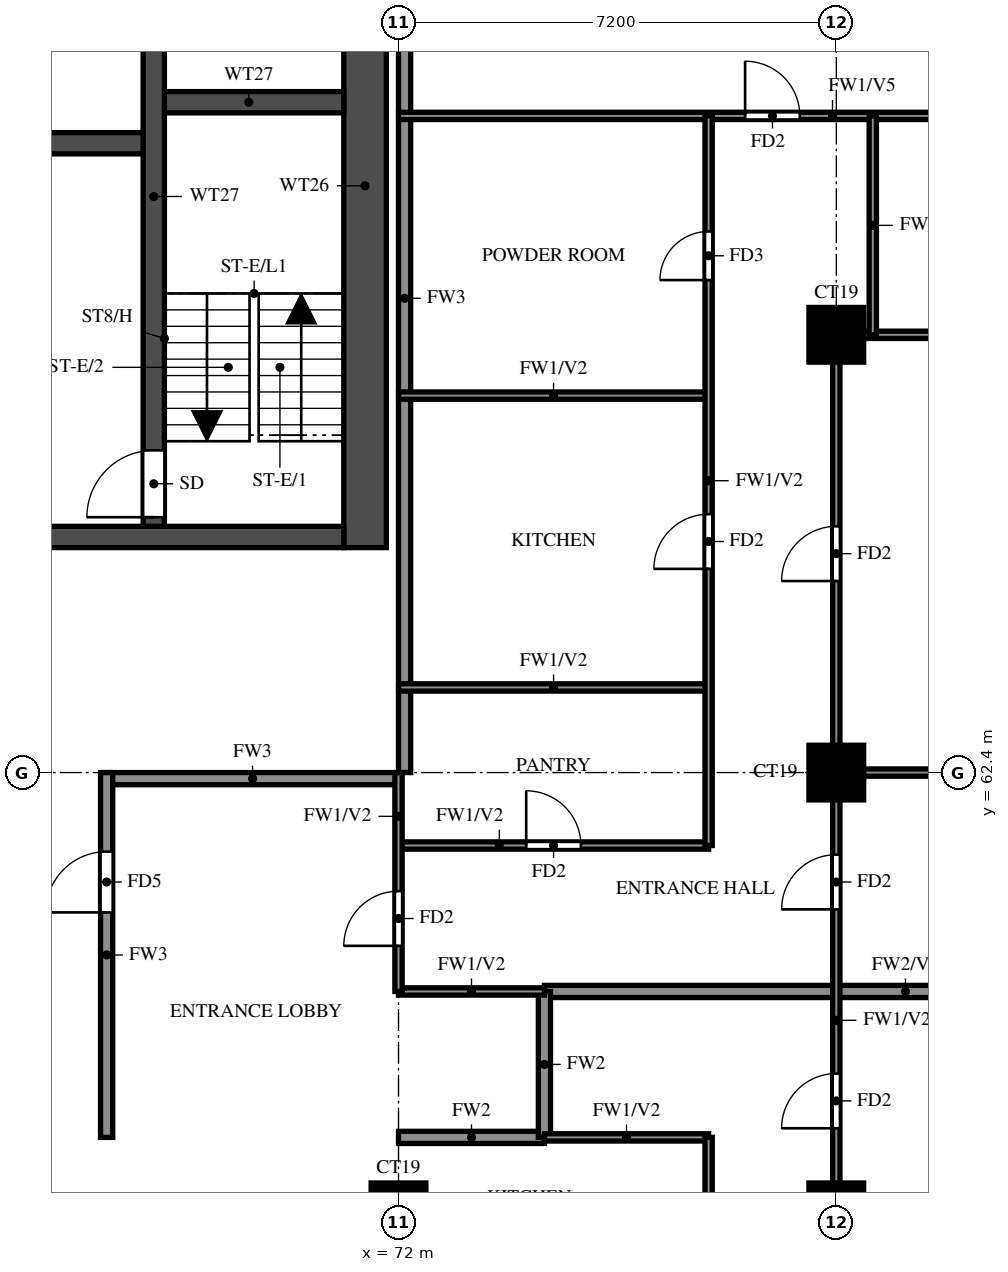
"""IFC4 building model, lengths in metres.
Left out: names, types, materials, properties, quantities, classifications, styles, units other than length and angle.
Written with IfcOpenShell. Run it as: python <this file> out.ifc"""

import sys

from ifc_helpers import new_model, si_unit, direction, frame, frame_2d, origin, origin_2d, place, context, subcontext, project, spatial, rectangle, extrude, source, transform, mapped, element, fill, save


model = new_model("IFC4")
c1 = context("Model", 3, precision=1e-05, world=origin(), true_north=direction((0.0, 1.0)))
c2 = subcontext(c1, "Body", "Model", "MODEL_VIEW")
j1 = project(units=[si_unit("LENGTHUNIT", "METRE"), si_unit("PLANEANGLEUNIT", "RADIAN")], contexts=[c1])
p1 = place(None, origin())
s1 = spatial("IfcSite", under=j1, at=p1, CompositionType="ELEMENT")
p2 = place(p1, origin())
s2 = spatial("IfcBuilding", under=s1, at=p2, CompositionType="ELEMENT")
p3 = place(p2, frame((0.0, 0.0, 178.0)))
s3 = spatial("IfcBuildingStorey", under=s2, at=p3, CompositionType="ELEMENT", Elevation=178.0)
m1 = source(origin(), c2, "Body", "SweptSolid", [
    extrude(rectangle(XDim=0.9, YDim=0.9, at=origin_2d()), origin(), (0.0, 0.0, 1.0), 3.2),
])
for number, where, z_axis, x_axis in (
    (1, (72.0, 55.2, 0.0), (0.0, 0.0, 1.0), (1.0, 0.0, 0.0)),
    (2, (79.2, 55.2, 0.0), (0.0, 0.0, 1.0), (1.0, 0.0, 0.0)),
    (3, (79.2, 62.4, 0.0), (0.0, 0.0, 1.0), (1.0, 0.0, 0.0)),
    (4, (79.2, 69.6, 0.0), (0.0, 0.0, 1.0), (1.0, 0.0, 0.0)),
):
    element("IfcColumn", number, at=place(p3, frame(where, z_axis=z_axis, x_axis=x_axis)), inside=s3, PredefinedType="COLUMN", context=c2, shape_type="MappedRepresentation", body=[
        mapped(m1, transform((0.0, 0.0, 0.0))),
    ])
p4 = place(p3, frame((71.45, 66.1, 0.0), z_axis=(0.0, 0.0, 1.0), x_axis=(0.0, 1.0, 0.0)))
e5 = element("IfcWall", 5, at=p4, inside=s3, PredefinedType="SHEAR", context=c2, shape_type="SweptSolid", body=[
    extrude(rectangle(XDim=11.9, YDim=0.7, at=frame_2d((5.95, 0.0))), origin(), (0.0, 0.0, 1.0), 3.2),
])
p5 = place(p3, frame((29.7, 66.275, 0.0), z_axis=(0.0, 0.0, 1.0), x_axis=(1.0, 0.0, 0.0)))
e6 = element("IfcWall", 6, at=p5, inside=s3, PredefinedType="SHEAR", context=c2, shape_type="SweptSolid", body=[
    extrude(rectangle(XDim=41.4, YDim=0.35, at=frame_2d((20.7, 0.0))), origin(), (0.0, 0.0, 1.0), 3.2),
])
p6 = place(p5, frame((0.925, 0.0, 0.0)))
e7 = element("IfcOpeningElement", 7, at=p6, cuts=e6, PredefinedType="OPENING", context=c2, shape_type="SweptSolid", body=[
    extrude(rectangle(XDim=1.1, YDim=2.1, at=frame_2d((0.55, 1.05))), frame((0.0, 0.185, 0.0), z_axis=(0.0, -1.0, 0.0), x_axis=(1.0, 0.0, 0.0)), (0.0, 0.0, 1.0), 0.37),
])
p7 = place(p5, frame((3.712, 0.0, 0.0)))
e8 = element("IfcOpeningElement", 8, at=p7, cuts=e6, PredefinedType="OPENING", context=c2, shape_type="SweptSolid", body=[
    extrude(rectangle(XDim=1.8, YDim=2.1, at=frame_2d((0.9, 1.05))), frame((0.0, 0.185, 0.0), z_axis=(0.0, -1.0, 0.0), x_axis=(1.0, 0.0, 0.0)), (0.0, 0.0, 1.0), 0.37),
])
p8 = place(p3, frame((32.825, 72.75, 0.0), z_axis=(0.0, 0.0, 1.0), x_axis=(1.0, 0.0, 0.0)))
e9 = element("IfcWall", 9, at=p8, inside=s3, PredefinedType="SHEAR", context=c2, shape_type="SweptSolid", body=[
    extrude(rectangle(XDim=35.15, YDim=0.35, at=frame_2d((17.575, 0.0))), origin(), (0.0, 0.0, 1.0), 3.2),
])
p9 = place(p8, frame((19.8, 0.0, 0.0)))
e10 = element("IfcOpeningElement", 10, at=p9, cuts=e9, PredefinedType="OPENING", context=c2, shape_type="SweptSolid", body=[
    extrude(rectangle(XDim=1.1, YDim=2.1, at=frame_2d((0.55, 1.05))), frame((0.0, 0.185, 0.0), z_axis=(0.0, -1.0, 0.0), x_axis=(1.0, 0.0, 0.0)), (0.0, 0.0, 1.0), 0.37),
])
p10 = place(p8, frame((27.7, 0.0, 0.0)))
e11 = element("IfcOpeningElement", 11, at=p10, cuts=e9, PredefinedType="OPENING", context=c2, shape_type="SweptSolid", body=[
    extrude(rectangle(XDim=1.1, YDim=2.1, at=frame_2d((0.55, 1.05))), frame((0.0, 0.185, 0.0), z_axis=(0.0, -1.0, 0.0), x_axis=(1.0, 0.0, 0.0)), (0.0, 0.0, 1.0), 0.37),
])
p11 = place(p8, frame((30.3, 0.0, 0.0)))
e12 = element("IfcOpeningElement", 12, at=p11, cuts=e9, PredefinedType="OPENING", context=c2, shape_type="SweptSolid", body=[
    extrude(rectangle(XDim=1.1, YDim=2.1, at=frame_2d((0.55, 1.05))), frame((0.0, 0.185, 0.0), z_axis=(0.0, -1.0, 0.0), x_axis=(1.0, 0.0, 0.0)), (0.0, 0.0, 1.0), 0.37),
])
p12 = place(p8, frame((3.8, 0.0, 0.0)))
e13 = element("IfcOpeningElement", 13, at=p12, cuts=e9, PredefinedType="OPENING", context=c2, shape_type="SweptSolid", body=[
    extrude(rectangle(XDim=1.1, YDim=2.1, at=frame_2d((0.55, 1.05))), frame((0.0, 0.185, 0.0), z_axis=(0.0, -1.0, 0.0), x_axis=(1.0, 0.0, 0.0)), (0.0, 0.0, 1.0), 0.37),
])
p13 = place(p8, frame((6.55, 0.0, 0.0)))
e14 = element("IfcOpeningElement", 14, at=p13, cuts=e9, PredefinedType="OPENING", context=c2, shape_type="SweptSolid", body=[
    extrude(rectangle(XDim=1.1, YDim=2.1, at=frame_2d((0.55, 1.05))), frame((0.0, 0.185, 0.0), z_axis=(0.0, -1.0, 0.0), x_axis=(1.0, 0.0, 0.0)), (0.0, 0.0, 1.0), 0.37),
])
p14 = place(p8, frame((9.3, 0.0, 0.0)))
e15 = element("IfcOpeningElement", 15, at=p14, cuts=e9, PredefinedType="OPENING", context=c2, shape_type="SweptSolid", body=[
    extrude(rectangle(XDim=1.1, YDim=2.1, at=frame_2d((0.55, 1.05))), frame((0.0, 0.185, 0.0), z_axis=(0.0, -1.0, 0.0), x_axis=(1.0, 0.0, 0.0)), (0.0, 0.0, 1.0), 0.37),
])
p15 = place(p8, frame((12.05, 0.0, 0.0)))
e16 = element("IfcOpeningElement", 16, at=p15, cuts=e9, PredefinedType="OPENING", context=c2, shape_type="SweptSolid", body=[
    extrude(rectangle(XDim=1.1, YDim=2.1, at=frame_2d((0.55, 1.05))), frame((0.0, 0.185, 0.0), z_axis=(0.0, -1.0, 0.0), x_axis=(1.0, 0.0, 0.0)), (0.0, 0.0, 1.0), 0.37),
])
p16 = place(p8, frame((14.8, 0.0, 0.0)))
e17 = element("IfcOpeningElement", 17, at=p16, cuts=e9, PredefinedType="OPENING", context=c2, shape_type="SweptSolid", body=[
    extrude(rectangle(XDim=1.1, YDim=2.1, at=frame_2d((0.55, 1.05))), frame((0.0, 0.185, 0.0), z_axis=(0.0, -1.0, 0.0), x_axis=(1.0, 0.0, 0.0)), (0.0, 0.0, 1.0), 0.37),
])
p17 = place(p8, frame((17.55, 0.0, 0.0)))
e18 = element("IfcOpeningElement", 18, at=p17, cuts=e9, PredefinedType="OPENING", context=c2, shape_type="SweptSolid", body=[
    extrude(rectangle(XDim=1.1, YDim=2.1, at=frame_2d((0.55, 1.05))), frame((0.0, 0.185, 0.0), z_axis=(0.0, -1.0, 0.0), x_axis=(1.0, 0.0, 0.0)), (0.0, 0.0, 1.0), 0.37),
])
p18 = place(p8, frame((0.938, 0.0, 0.0)))
e19 = element("IfcOpeningElement", 19, at=p18, cuts=e9, PredefinedType="OPENING", context=c2, shape_type="SweptSolid", body=[
    extrude(rectangle(XDim=1.1, YDim=2.1, at=frame_2d((0.55, 1.05))), frame((0.0, 0.185, 0.0), z_axis=(0.0, -1.0, 0.0), x_axis=(1.0, 0.0, 0.0)), (0.0, 0.0, 1.0), 0.37),
])
p19 = place(p3, frame((67.975, 73.425, 0.0), z_axis=(0.0, 0.0, 1.0), x_axis=(1.0, 0.0, 0.0)))
e20 = element("IfcWall", 20, at=p19, inside=s3, PredefinedType="SHEAR", context=c2, shape_type="SweptSolid", body=[
    extrude(rectangle(XDim=3.125, YDim=0.35, at=frame_2d((1.562, 0.0))), origin(), (0.0, 0.0, 1.0), 3.2),
])
p20 = place(p3, frame((67.975, 66.45, 0.0), z_axis=(0.0, 0.0, 1.0), x_axis=(0.0, 1.0, 0.0)))
e21 = element("IfcWall", 21, at=p20, inside=s3, PredefinedType="SHEAR", context=c2, shape_type="SweptSolid", body=[
    extrude(rectangle(XDim=10.85, YDim=0.35, at=frame_2d((5.425, 0.0))), origin(), (0.0, 0.0, 1.0), 3.2),
])
p21 = place(p20, frame((0.15, 0.0, 0.0)))
e22 = element("IfcOpeningElement", 22, at=p21, cuts=e21, PredefinedType="OPENING", context=c2, shape_type="SweptSolid", body=[
    extrude(rectangle(XDim=1.1, YDim=2.1, at=frame_2d((0.55, 1.05))), frame((0.0, 0.185, 0.0), z_axis=(0.0, -1.0, 0.0), x_axis=(1.0, 0.0, 0.0)), (0.0, 0.0, 1.0), 0.37),
])
p22 = place(p3, frame((67.2, 62.3, 0.0), z_axis=(0.0, 0.0, 1.0), x_axis=(1.0, 0.0, 0.0)))
e23 = element("IfcWall", 23, at=p22, inside=s3, PredefinedType="SOLIDWALL", context=c2, shape_type="SweptSolid", body=[
    extrude(rectangle(XDim=4.8, YDim=0.2, at=frame_2d((2.4, 0.0))), origin(), (0.0, 0.0, 1.0), 3.2),
])
p23 = place(p3, frame((67.2, 56.4, 0.0), z_axis=(0.0, 0.0, 1.0), x_axis=(0.0, 1.0, 0.0)))
e24 = element("IfcWall", 24, at=p23, inside=s3, PredefinedType="SOLIDWALL", context=c2, shape_type="SweptSolid", body=[
    extrude(rectangle(XDim=6.0, YDim=0.2, at=frame_2d((3.0, 0.0))), origin(), (0.0, 0.0, 1.0), 3.2),
])
p24 = place(p23, frame((3.7, 0.0, 0.0)))
e25 = element("IfcOpeningElement", 25, at=p24, cuts=e24, PredefinedType="OPENING", context=c2, shape_type="SweptSolid", body=[
    extrude(rectangle(XDim=1.0, YDim=2.1, at=frame_2d((0.5, 1.05))), frame((0.0, 0.11, 0.0), z_axis=(0.0, -1.0, 0.0), x_axis=(1.0, 0.0, 0.0)), (0.0, 0.0, 1.0), 0.22),
])
p25 = place(p3, frame((72.1, 62.4, 0.0), z_axis=(0.0, 0.0, 1.0), x_axis=(0.0, 1.0, 0.0)))
e26 = element("IfcWall", 26, at=p25, inside=s3, PredefinedType="SOLIDWALL", context=c2, shape_type="SweptSolid", body=[
    extrude(rectangle(XDim=15.6, YDim=0.2, at=frame_2d((7.8, 0.0))), origin(), (0.0, 0.0, 1.0), 3.2),
])
p26 = place(p3, frame((72.0, 56.4, 0.0), z_axis=(0.0, 0.0, 1.0), x_axis=(1.0, 0.0, 0.0)))
e27 = element("IfcWall", 27, at=p26, inside=s3, PredefinedType="SOLIDWALL", context=c2, shape_type="SweptSolid", body=[
    extrude(rectangle(XDim=2.4, YDim=0.2, at=frame_2d((1.2, 0.0))), origin(), (0.0, 0.0, 1.0), 3.2),
])
p27 = place(p3, frame((74.4, 58.8, 0.0), z_axis=(0.0, 0.0, 1.0), x_axis=(1.0, 0.0, 0.0)))
e28 = element("IfcWall", 28, at=p27, inside=s3, PredefinedType="SOLIDWALL", context=c2, shape_type="SweptSolid", body=[
    extrude(rectangle(XDim=11.875, YDim=0.2, at=frame_2d((5.938, 0.0))), origin(), (0.0, 0.0, 1.0), 2.3),
])
p28 = place(p3, frame((74.4, 56.4, 0.0), z_axis=(0.0, 0.0, 1.0), x_axis=(0.0, 1.0, 0.0)))
e29 = element("IfcWall", 29, at=p28, inside=s3, PredefinedType="SOLIDWALL", context=c2, shape_type="SweptSolid", body=[
    extrude(rectangle(XDim=2.4, YDim=0.2, at=frame_2d((1.2, 0.0))), origin(), (0.0, 0.0, 1.0), 3.2),
])
p29 = place(p3, frame((74.4, 56.4, 0.0), z_axis=(0.0, 0.0, 1.0), x_axis=(1.0, 0.0, 0.0)))
e30 = element("IfcWall", 30, at=p29, inside=s3, PredefinedType="PARTITIONING", context=c2, shape_type="SweptSolid", body=[
    extrude(rectangle(XDim=2.7, YDim=0.12, at=frame_2d((1.35, 0.0))), origin(), (0.0, 0.0, 1.0), 3.2),
])
p30 = place(p3, frame((72.0, 58.8, 0.0), z_axis=(0.0, 0.0, 1.0), x_axis=(1.0, 0.0, 0.0)))
e31 = element("IfcWall", 31, at=p30, inside=s3, PredefinedType="PARTITIONING", context=c2, shape_type="SweptSolid", body=[
    extrude(rectangle(XDim=2.4, YDim=0.12, at=frame_2d((1.2, 0.0))), origin(), (0.0, 0.0, 1.0), 3.2),
])
p31 = place(p3, frame((72.0, 61.2, 0.0), z_axis=(0.0, 0.0, 1.0), x_axis=(1.0, 0.0, 0.0)))
e32 = element("IfcWall", 32, at=p31, inside=s3, PredefinedType="PARTITIONING", context=c2, shape_type="SweptSolid", body=[
    extrude(rectangle(XDim=5.1, YDim=0.12, at=frame_2d((2.55, 0.0))), origin(), (0.0, 0.0, 1.0), 3.2),
])
p32 = place(p31, frame((2.1, 0.0, 0.0)))
e33 = element("IfcOpeningElement", 33, at=p32, cuts=e32, PredefinedType="OPENING", context=c2, shape_type="SweptSolid", body=[
    extrude(rectangle(XDim=0.9, YDim=2.1, at=frame_2d((0.45, 1.05))), frame((0.0, 0.07, 0.0), z_axis=(0.0, -1.0, 0.0), x_axis=(1.0, 0.0, 0.0)), (0.0, 0.0, 1.0), 0.14),
])
p33 = place(p3, frame((79.2, 62.4, 0.0), z_axis=(0.0, 0.0, 1.0), x_axis=(1.0, 0.0, 0.0)))
e34 = element("IfcWall", 34, at=p33, inside=s3, PredefinedType="PARTITIONING", context=c2, shape_type="SweptSolid", body=[
    extrude(rectangle(XDim=7.075, YDim=0.12, at=frame_2d((3.538, 0.0))), origin(), (0.0, 0.0, 1.0), 3.2),
])
for number, where, z_axis, x_axis in (
    (35, (72.0, 63.8, 0.0), (0.0, 0.0, 1.0), (1.0, 0.0, 0.0)),
    (36, (72.0, 68.6, 0.0), (0.0, 0.0, 1.0), (1.0, 0.0, 0.0)),
):
    element("IfcWall", number, at=place(p3, frame(where, z_axis=z_axis, x_axis=x_axis)), inside=s3, PredefinedType="PARTITIONING", context=c2, shape_type="SweptSolid", body=[
        extrude(rectangle(XDim=5.1, YDim=0.12, at=frame_2d((2.55, 0.0))), origin(), (0.0, 0.0, 1.0), 3.2),
    ])
p34 = place(p3, frame((79.2, 69.6, 0.0), z_axis=(0.0, 0.0, 1.0), x_axis=(1.0, 0.0, 0.0)))
e37 = element("IfcWall", 37, at=p34, inside=s3, PredefinedType="PARTITIONING", context=c2, shape_type="SweptSolid", body=[
    extrude(rectangle(XDim=7.075, YDim=0.12, at=frame_2d((3.538, 0.0))), origin(), (0.0, 0.0, 1.0), 3.2),
])
p35 = place(p34, frame((3.438, 0.0, 0.0)))
e38 = element("IfcOpeningElement", 38, at=p35, cuts=e37, PredefinedType="OPENING", context=c2, shape_type="SweptSolid", body=[
    extrude(rectangle(XDim=0.8, YDim=2.1, at=frame_2d((0.4, 1.05))), frame((0.0, 0.07, 0.0), z_axis=(0.0, -1.0, 0.0), x_axis=(1.0, 0.0, 0.0)), (0.0, 0.0, 1.0), 0.14),
])
p36 = place(p3, frame((72.0, 73.2, 0.0), z_axis=(0.0, 0.0, 1.0), x_axis=(1.0, 0.0, 0.0)))
e39 = element("IfcWall", 39, at=p36, inside=s3, PredefinedType="PARTITIONING", context=c2, shape_type="SweptSolid", body=[
    extrude(rectangle(XDim=14.275, YDim=0.12, at=frame_2d((7.137, 0.0))), origin(), (0.0, 0.0, 1.0), 2.3),
])
p37 = place(p36, frame((5.7, 0.0, 0.0)))
e40 = element("IfcOpeningElement", 40, at=p37, cuts=e39, PredefinedType="OPENING", context=c2, shape_type="SweptSolid", body=[
    extrude(rectangle(XDim=0.9, YDim=2.1, at=frame_2d((0.45, 1.05))), frame((0.0, 0.07, 0.0), z_axis=(0.0, -1.0, 0.0), x_axis=(1.0, 0.0, 0.0)), (0.0, 0.0, 1.0), 0.14),
])
p38 = place(p3, frame((72.0, 58.8, 0.0), z_axis=(0.0, 0.0, 1.0), x_axis=(0.0, 1.0, 0.0)))
e41 = element("IfcWall", 41, at=p38, inside=s3, PredefinedType="PARTITIONING", context=c2, shape_type="SweptSolid", body=[
    extrude(rectangle(XDim=3.6, YDim=0.12, at=frame_2d((1.8, 0.0))), origin(), (0.0, 0.0, 1.0), 3.2),
])
p39 = place(p38, frame((0.75, 0.0, 0.0)))
e42 = element("IfcOpeningElement", 42, at=p39, cuts=e41, PredefinedType="OPENING", context=c2, shape_type="SweptSolid", body=[
    extrude(rectangle(XDim=0.9, YDim=2.1, at=frame_2d((0.45, 1.05))), frame((0.0, 0.07, 0.0), z_axis=(0.0, -1.0, 0.0), x_axis=(1.0, 0.0, 0.0)), (0.0, 0.0, 1.0), 0.14),
])
p40 = place(p3, frame((77.1, 54.0, 0.0), z_axis=(0.0, 0.0, 1.0), x_axis=(0.0, 1.0, 0.0)))
e43 = element("IfcWall", 43, at=p40, inside=s3, PredefinedType="PARTITIONING", context=c2, shape_type="SweptSolid", body=[
    extrude(rectangle(XDim=2.4, YDim=0.12, at=frame_2d((1.2, 0.0))), origin(), (0.0, 0.0, 1.0), 3.2),
])
p41 = place(p3, frame((77.1, 61.2, 0.0), z_axis=(0.0, 0.0, 1.0), x_axis=(0.0, 1.0, 0.0)))
e44 = element("IfcWall", 44, at=p41, inside=s3, PredefinedType="PARTITIONING", context=c2, shape_type="SweptSolid", body=[
    extrude(rectangle(XDim=12.0, YDim=0.12, at=frame_2d((6.0, 0.0))), origin(), (0.0, 0.0, 1.0), 3.2),
])
p42 = place(p41, frame((4.55, 0.0, 0.0)))
e45 = element("IfcOpeningElement", 45, at=p42, cuts=e44, PredefinedType="OPENING", context=c2, shape_type="SweptSolid", body=[
    extrude(rectangle(XDim=0.9, YDim=2.1, at=frame_2d((0.45, 1.05))), frame((0.0, 0.07, 0.0), z_axis=(0.0, -1.0, 0.0), x_axis=(1.0, 0.0, 0.0)), (0.0, 0.0, 1.0), 0.14),
])
p43 = place(p41, frame((9.3, 0.0, 0.0)))
e46 = element("IfcOpeningElement", 46, at=p43, cuts=e44, PredefinedType="OPENING", context=c2, shape_type="SweptSolid", body=[
    extrude(rectangle(XDim=0.8, YDim=2.1, at=frame_2d((0.4, 1.05))), frame((0.0, 0.07, 0.0), z_axis=(0.0, -1.0, 0.0), x_axis=(1.0, 0.0, 0.0)), (0.0, 0.0, 1.0), 0.14),
])
p44 = place(p3, frame((79.2, 48.125, 0.0), z_axis=(0.0, 0.0, 1.0), x_axis=(0.0, 1.0, 0.0)))
e47 = element("IfcWall", 47, at=p44, inside=s3, PredefinedType="PARTITIONING", context=c2, shape_type="SweptSolid", body=[
    extrude(rectangle(XDim=21.475, YDim=0.12, at=frame_2d((10.738, 0.0))), origin(), (0.0, 0.0, 1.0), 3.2),
])
p45 = place(p44, frame((2.788, 0.0, 0.0)))
e48 = element("IfcOpeningElement", 48, at=p45, cuts=e47, PredefinedType="OPENING", context=c2, shape_type="SweptSolid", body=[
    extrude(rectangle(XDim=1.5, YDim=2.1, at=frame_2d((0.75, 1.05))), frame((0.0, 0.07, 0.0), z_axis=(0.0, -1.0, 0.0), x_axis=(1.0, 0.0, 0.0)), (0.0, 0.0, 1.0), 0.14),
])
p46 = place(p44, frame((8.425, 0.0, 0.0)))
e49 = element("IfcOpeningElement", 49, at=p46, cuts=e47, PredefinedType="OPENING", context=c2, shape_type="SweptSolid", body=[
    extrude(rectangle(XDim=0.9, YDim=2.1, at=frame_2d((0.45, 1.05))), frame((0.0, 0.07, 0.0), z_axis=(0.0, -1.0, 0.0), x_axis=(1.0, 0.0, 0.0)), (0.0, 0.0, 1.0), 0.14),
])
p47 = place(p44, frame((12.025, 0.0, 0.0)))
e50 = element("IfcOpeningElement", 50, at=p47, cuts=e47, PredefinedType="OPENING", context=c2, shape_type="SweptSolid", body=[
    extrude(rectangle(XDim=0.9, YDim=2.1, at=frame_2d((0.45, 1.05))), frame((0.0, 0.07, 0.0), z_axis=(0.0, -1.0, 0.0), x_axis=(1.0, 0.0, 0.0)), (0.0, 0.0, 1.0), 0.14),
])
p48 = place(p44, frame((17.425, 0.0, 0.0)))
e51 = element("IfcOpeningElement", 51, at=p48, cuts=e47, PredefinedType="OPENING", context=c2, shape_type="SweptSolid", body=[
    extrude(rectangle(XDim=0.9, YDim=2.1, at=frame_2d((0.45, 1.05))), frame((0.0, 0.07, 0.0), z_axis=(0.0, -1.0, 0.0), x_axis=(1.0, 0.0, 0.0)), (0.0, 0.0, 1.0), 0.14),
])
p49 = place(p3, frame((79.8, 69.6, 0.0), z_axis=(0.0, 0.0, 1.0), x_axis=(0.0, 1.0, 0.0)))
e52 = element("IfcWall", 52, at=p49, inside=s3, PredefinedType="PARTITIONING", context=c2, shape_type="SweptSolid", body=[
    extrude(rectangle(XDim=3.6, YDim=0.12, at=frame_2d((1.8, 0.0))), origin(), (0.0, 0.0, 1.0), 3.2),
])
p50 = place(p21, origin())
e53 = element("IfcDoor", 53, at=p50, inside=s3, OperationType="SINGLE_SWING_LEFT", PredefinedType="DOOR", context=c2, shape_type="SweptSolid", body=[
    extrude(rectangle(XDim=1.1, YDim=2.1, at=frame_2d((0.55, 1.05))), frame((0.0, 0.025, 0.0), z_axis=(0.0, -1.0, 0.0), x_axis=(1.0, 0.0, 0.0)), (0.0, 0.0, 1.0), 0.05),
])
fill(e22, e53)
p51 = place(p46, origin())
e54 = element("IfcDoor", 54, at=p51, inside=s3, OperationType="SINGLE_SWING_LEFT", PredefinedType="DOOR", context=c2, shape_type="SweptSolid", body=[
    extrude(rectangle(XDim=0.9, YDim=2.1, at=frame_2d((0.45, 1.05))), frame((0.0, 0.025, 0.0), z_axis=(0.0, -1.0, 0.0), x_axis=(1.0, 0.0, 0.0)), (0.0, 0.0, 1.0), 0.05),
])
fill(e49, e54)
p52 = place(p39, origin())
e55 = element("IfcDoor", 55, at=p52, inside=s3, OperationType="SINGLE_SWING_LEFT", PredefinedType="DOOR", context=c2, shape_type="SweptSolid", body=[
    extrude(rectangle(XDim=0.9, YDim=2.1, at=frame_2d((0.45, 1.05))), frame((0.0, 0.025, 0.0), z_axis=(0.0, -1.0, 0.0), x_axis=(1.0, 0.0, 0.0)), (0.0, 0.0, 1.0), 0.05),
])
fill(e42, e55)
p53 = place(p24, origin())
e56 = element("IfcDoor", 56, at=p53, inside=s3, OperationType="SINGLE_SWING_LEFT", PredefinedType="DOOR", context=c2, shape_type="SweptSolid", body=[
    extrude(rectangle(XDim=1.0, YDim=2.1, at=frame_2d((0.5, 1.05))), frame((0.0, 0.025, 0.0), z_axis=(0.0, -1.0, 0.0), x_axis=(1.0, 0.0, 0.0)), (0.0, 0.0, 1.0), 0.05),
])
fill(e25, e56)
p54 = place(p47, origin())
e57 = element("IfcDoor", 57, at=p54, inside=s3, OperationType="SINGLE_SWING_RIGHT", PredefinedType="DOOR", context=c2, shape_type="SweptSolid", body=[
    extrude(rectangle(XDim=0.9, YDim=2.1, at=frame_2d((0.45, 1.05))), frame((0.0, 0.025, 0.0), z_axis=(0.0, -1.0, 0.0), x_axis=(1.0, 0.0, 0.0)), (0.0, 0.0, 1.0), 0.05),
])
fill(e50, e57)
p55 = place(p48, origin())
e58 = element("IfcDoor", 58, at=p55, inside=s3, OperationType="SINGLE_SWING_LEFT", PredefinedType="DOOR", context=c2, shape_type="SweptSolid", body=[
    extrude(rectangle(XDim=0.9, YDim=2.1, at=frame_2d((0.45, 1.05))), frame((0.0, 0.025, 0.0), z_axis=(0.0, -1.0, 0.0), x_axis=(1.0, 0.0, 0.0)), (0.0, 0.0, 1.0), 0.05),
])
fill(e51, e58)
p56 = place(p37, origin())
e59 = element("IfcDoor", 59, at=p56, inside=s3, OperationType="SINGLE_SWING_RIGHT", PredefinedType="DOOR", context=c2, shape_type="SweptSolid", body=[
    extrude(rectangle(XDim=0.9, YDim=2.1, at=frame_2d((0.45, 1.05))), frame((0.0, 0.025, 0.0), z_axis=(0.0, -1.0, 0.0), x_axis=(1.0, 0.0, 0.0)), (0.0, 0.0, 1.0), 0.05),
])
fill(e40, e59)
p57 = place(p32, origin())
e60 = element("IfcDoor", 60, at=p57, inside=s3, OperationType="SINGLE_SWING_LEFT", PredefinedType="DOOR", context=c2, shape_type="SweptSolid", body=[
    extrude(rectangle(XDim=0.9, YDim=2.1, at=frame_2d((0.45, 1.05))), frame((0.0, 0.025, 0.0), z_axis=(0.0, -1.0, 0.0), x_axis=(1.0, 0.0, 0.0)), (0.0, 0.0, 1.0), 0.05),
])
fill(e33, e60)
p58 = place(p42, origin())
e61 = element("IfcDoor", 61, at=p58, inside=s3, OperationType="SINGLE_SWING_LEFT", PredefinedType="DOOR", context=c2, shape_type="SweptSolid", body=[
    extrude(rectangle(XDim=0.9, YDim=2.1, at=frame_2d((0.45, 1.05))), frame((0.0, 0.025, 0.0), z_axis=(0.0, -1.0, 0.0), x_axis=(1.0, 0.0, 0.0)), (0.0, 0.0, 1.0), 0.05),
])
fill(e45, e61)
p59 = place(p43, origin())
e62 = element("IfcDoor", 62, at=p59, inside=s3, OperationType="SINGLE_SWING_RIGHT", PredefinedType="DOOR", context=c2, shape_type="SweptSolid", body=[
    extrude(rectangle(XDim=0.8, YDim=2.1, at=frame_2d((0.4, 1.05))), frame((0.0, 0.025, 0.0), z_axis=(0.0, -1.0, 0.0), x_axis=(1.0, 0.0, 0.0)), (0.0, 0.0, 1.0), 0.05),
])
fill(e46, e62)
save(model, sys.argv[1])
